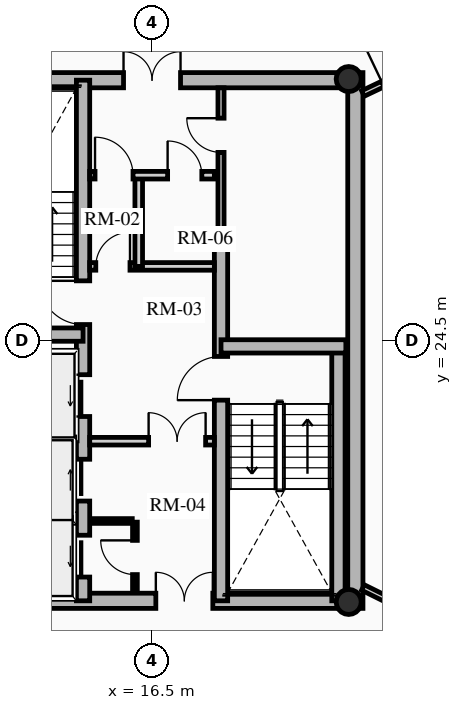
"""IFC4 building model, lengths in metres.
Left out: names, types, materials, properties, quantities, classifications, styles, units other than length and angle.
Written with IfcOpenShell. Run it as: python <this file> out.ifc"""

import sys

from ifc_helpers import new_model, si_unit, direction, frame, frame_2d, origin, origin_2d, place, context, subcontext, project, spatial, rectangle, hollow_circle, extrude, source, transform, mapped, element, fill, save


model = new_model("IFC4")
c1 = context("Model", 3, precision=1e-05, world=origin(), true_north=direction((0.0, 1.0)))
c2 = subcontext(c1, "Body", "Model", "MODEL_VIEW")
j1 = project(units=[si_unit("LENGTHUNIT", "METRE"), si_unit("PLANEANGLEUNIT", "RADIAN")], contexts=[c1])
p1 = place(None, origin())
s1 = spatial("IfcSite", under=j1, at=p1, CompositionType="ELEMENT")
p2 = place(p1, origin())
s2 = spatial("IfcBuilding", under=s1, at=p2, CompositionType="ELEMENT")
p3 = place(p2, frame((0.0, 0.0, 214.12)))
s3 = spatial("IfcBuildingStorey", under=s2, at=p3, CompositionType="ELEMENT", Elevation=214.12)
p4 = place(p3, frame((21.85, 17.45, 0.0), z_axis=(0.0, 0.0, 1.0), x_axis=(0.0, 1.0, 0.0)))
e1 = element("IfcWall", 1, at=p4, inside=s3, PredefinedType="SHEAR", context=c2, shape_type="SweptSolid", body=[
    extrude(rectangle(XDim=14.1, YDim=0.4, at=frame_2d((7.05, 0.0))), origin(), (0.0, 0.0, 1.0), 2.91),
])
p5 = place(p3, frame((11.15, 17.65, 0.0), z_axis=(0.0, 0.0, 1.0), x_axis=(1.0, 0.0, 0.0)))
e2 = element("IfcWall", 2, at=p5, inside=s3, PredefinedType="SHEAR", context=c2, shape_type="SweptSolid", body=[
    extrude(rectangle(XDim=10.7, YDim=0.4, at=frame_2d((5.35, 0.0))), origin(), (0.0, 0.0, 1.0), 2.91),
])
m1 = source(origin(), c2, "Body", "SweptSolid", [
    extrude(rectangle(XDim=1.5, YDim=2.02, at=frame_2d((0.75, 1.01))), frame((0.0, 0.21, 0.0), z_axis=(0.0, -1.0, 0.0), x_axis=(1.0, 0.0, 0.0)), (0.0, 0.0, 1.0), 0.42),
])
p6 = place(p5, frame((5.45, 0.0, 0.0)))
e3 = element("IfcOpeningElement", 3, at=p6, cuts=e2, PredefinedType="OPENING", context=c2, shape_type="MappedRepresentation", body=[
    mapped(m1, transform((0.0, 0.0, 0.0), x_axis=(1.0, 0.0, 0.0), y_axis=(0.0, 1.0, 0.0), z_axis=(0.0, 0.0, 1.0), scale=1.0)),
])
p7 = place(p3, frame((11.15, 31.35, 0.0), z_axis=(0.0, 0.0, 1.0), x_axis=(1.0, 0.0, 0.0)))
e4 = element("IfcWall", 4, at=p7, inside=s3, PredefinedType="SHEAR", context=c2, shape_type="SweptSolid", body=[
    extrude(rectangle(XDim=10.7, YDim=0.4, at=frame_2d((5.35, 0.0))), origin(), (0.0, 0.0, 1.0), 2.91),
])
p8 = place(p7, frame((4.6, 0.0, 0.0)))
e5 = element("IfcOpeningElement", 5, at=p8, cuts=e4, PredefinedType="OPENING", context=c2, shape_type="MappedRepresentation", body=[
    mapped(m1, transform((0.0, 0.0, 0.0), x_axis=(1.0, 0.0, 0.0), y_axis=(0.0, 1.0, 0.0), z_axis=(0.0, 0.0, 1.0), scale=1.0)),
])
p9 = place(p3, frame((14.685, 17.65, 0.0), z_axis=(0.0, 0.0, 1.0), x_axis=(0.0, 1.0, 0.0)))
e6 = element("IfcWall", 6, at=p9, inside=s3, PredefinedType="SHEAR", context=c2, shape_type="SweptSolid", body=[
    extrude(rectangle(XDim=13.7, YDim=0.35, at=frame_2d((6.85, 0.0))), origin(), (0.0, 0.0, 1.0), 2.91),
])
m2 = source(origin(), c2, "Body", "SweptSolid", [
    extrude(rectangle(XDim=1.1, YDim=2.015, at=frame_2d((0.55, 1.007))), frame((0.0, 0.185, 0.0), z_axis=(0.0, -1.0, 0.0), x_axis=(1.0, 0.0, 0.0)), (0.0, 0.0, 1.0), 0.37),
])
p10 = place(p9, frame((4.85, 0.0, 0.0)))
e7 = element("IfcOpeningElement", 7, at=p10, cuts=e6, PredefinedType="OPENING", context=c2, shape_type="MappedRepresentation", body=[
    mapped(m2, transform((0.0, 0.0, 0.0), x_axis=(1.0, 0.0, 0.0), y_axis=(0.0, 1.0, 0.0), z_axis=(0.0, 0.0, 1.0), scale=1.0)),
])
p11 = place(p9, frame((0.625, 0.0, 0.0)))
e8 = element("IfcOpeningElement", 8, at=p11, cuts=e6, PredefinedType="OPENING", context=c2, shape_type="MappedRepresentation", body=[
    mapped(m2, transform((0.0, 0.0, 0.0), x_axis=(1.0, 0.0, 0.0), y_axis=(0.0, 1.0, 0.0), z_axis=(0.0, 0.0, 1.0), scale=1.0)),
])
p12 = place(p9, frame((2.625, 0.0, 0.0)))
e9 = element("IfcOpeningElement", 9, at=p12, cuts=e6, PredefinedType="OPENING", context=c2, shape_type="MappedRepresentation", body=[
    mapped(m2, transform((0.0, 0.0, 0.0), x_axis=(1.0, 0.0, 0.0), y_axis=(0.0, 1.0, 0.0), z_axis=(0.0, 0.0, 1.0), scale=1.0)),
])
m3 = source(origin(), c2, "Body", "SweptSolid", [
    extrude(rectangle(XDim=1.15, YDim=2.02, at=frame_2d((0.575, 1.01))), frame((0.0, 0.185, 0.0), z_axis=(0.0, -1.0, 0.0), x_axis=(1.0, 0.0, 0.0)), (0.0, 0.0, 1.0), 0.37),
])
p13 = place(p9, frame((7.27, 0.0, 0.0)))
e10 = element("IfcOpeningElement", 10, at=p13, cuts=e6, PredefinedType="OPENING", context=c2, shape_type="MappedRepresentation", body=[
    mapped(m3, transform((0.0, 0.0, 0.0), x_axis=(1.0, 0.0, 0.0), y_axis=(0.0, 1.0, 0.0), z_axis=(0.0, 0.0, 1.0), scale=1.0)),
])
p14 = place(p3, frame((18.315, 17.65, 0.0), z_axis=(0.0, 0.0, 1.0), x_axis=(0.0, 1.0, 0.0)))
e11 = element("IfcWall", 11, at=p14, inside=s3, PredefinedType="SHEAR", context=c2, shape_type="SweptSolid", body=[
    extrude(rectangle(XDim=9.6, YDim=0.35, at=frame_2d((4.8, 0.0))), origin(), (0.0, 0.0, 1.0), 2.91),
])
p15 = place(p14, frame((5.28, 0.0, 0.0)))
e12 = element("IfcOpeningElement", 12, at=p15, cuts=e11, PredefinedType="OPENING", context=c2, shape_type="MappedRepresentation", body=[
    mapped(m3, transform((0.0, 0.0, 0.0), x_axis=(1.0, 0.0, 0.0), y_axis=(0.0, 1.0, 0.0), z_axis=(0.0, 0.0, 1.0), scale=1.0)),
])
p16 = place(p3, frame((11.4, 24.655, 0.0), z_axis=(0.0, 0.0, 1.0), x_axis=(1.0, 0.0, 0.0)))
e13 = element("IfcWall", 13, at=p16, inside=s3, PredefinedType="SHEAR", context=c2, shape_type="SweptSolid", body=[
    extrude(rectangle(XDim=3.285, YDim=0.35, at=frame_2d((1.643, 0.0))), origin(), (0.0, 0.0, 1.0), 2.91),
])
p17 = place(p3, frame((21.405, 17.65, 0.0), z_axis=(0.0, 0.0, 1.0), x_axis=(0.0, 1.0, 0.0)))
e14 = element("IfcWall", 14, at=p17, inside=s3, PredefinedType="SHEAR", context=c2, shape_type="SweptSolid", body=[
    extrude(rectangle(XDim=6.695, YDim=0.35, at=frame_2d((3.348, 0.0))), origin(), (0.0, 0.0, 1.0), 2.91),
])
p18 = place(p3, frame((18.315, 24.345, 0.0), z_axis=(0.0, 0.0, 1.0), x_axis=(1.0, 0.0, 0.0)))
e15 = element("IfcWall", 15, at=p18, inside=s3, PredefinedType="SHEAR", context=c2, shape_type="SweptSolid", body=[
    extrude(rectangle(XDim=3.285, YDim=0.35, at=frame_2d((1.643, 0.0))), origin(), (0.0, 0.0, 1.0), 2.91),
])
for number, where, z_axis, x_axis in (
    (16, (21.675, 17.62, 0.0), (0.0, 0.0, 1.0), (1.0, 0.0, 0.0)),
    (17, (21.675, 31.38, 0.0), (0.0, 0.0, 1.0), (1.0, 0.0, 0.0)),
):
    element("IfcColumn", number, at=place(p3, frame(where, z_axis=z_axis, x_axis=x_axis)), inside=s3, PredefinedType="COLUMN", context=c2, shape_type="SweptSolid", body=[
        extrude(hollow_circle(Radius=0.33, WallThickness=0.025, at=origin_2d()), origin(), (0.0, 0.0, 1.0), 2.91),
    ])
for number, where, z_axis, x_axis in (
    (18, (11.52, 21.8, 0.0), (0.0, 0.0, 1.0), (1.0, 0.0, 0.0)),
    (19, (11.52, 19.825, 0.0), (0.0, 0.0, 1.0), (1.0, 0.0, 0.0)),
):
    element("IfcWall", number, at=place(p3, frame(where, z_axis=z_axis, x_axis=x_axis)), inside=s3, PredefinedType="SHEAR", context=c2, shape_type="SweptSolid", body=[
        extrude(rectangle(XDim=2.97, YDim=0.2, at=frame_2d((1.485, 0.0))), origin(), (0.0, 0.0, 1.0), 2.91),
    ])
p19 = place(p3, frame((14.86, 21.85, 0.0), z_axis=(0.0, 0.0, 1.0), x_axis=(1.0, 0.0, 0.0)))
e20 = element("IfcWall", 20, at=p19, inside=s3, PredefinedType="PARTITIONING", context=c2, shape_type="SweptSolid", body=[
    extrude(rectangle(XDim=3.28, YDim=0.2, at=frame_2d((1.64, 0.0))), origin(), (0.0, 0.0, 1.0), 2.685),
])
m4 = source(origin(), c2, "Body", "SweptSolid", [
    extrude(rectangle(XDim=1.5, YDim=2.02, at=frame_2d((0.75, 1.01))), frame((0.0, 0.11, 0.0), z_axis=(0.0, -1.0, 0.0), x_axis=(1.0, 0.0, 0.0)), (0.0, 0.0, 1.0), 0.22),
])
p20 = place(p19, frame((1.55, 0.0, 0.0)))
e21 = element("IfcOpeningElement", 21, at=p20, cuts=e20, PredefinedType="OPENING", context=c2, shape_type="MappedRepresentation", body=[
    mapped(m4, transform((0.0, 0.0, 0.0), x_axis=(1.0, 0.0, 0.0), y_axis=(0.0, 1.0, 0.0), z_axis=(0.0, 0.0, 1.0), scale=1.0)),
])
p21 = place(p3, frame((14.86, 26.45, 0.0), z_axis=(0.0, 0.0, 1.0), x_axis=(1.0, 0.0, 0.0)))
e22 = element("IfcWall", 22, at=p21, inside=s3, PredefinedType="PARTITIONING", context=c2, shape_type="SweptSolid", body=[
    extrude(rectangle(XDim=3.28, YDim=0.2, at=frame_2d((1.64, 0.0))), origin(), (0.0, 0.0, 1.0), 2.685),
])
m5 = source(origin(), c2, "Body", "SweptSolid", [
    extrude(rectangle(XDim=0.9, YDim=2.005, at=frame_2d((0.45, 1.002))), frame((0.0, 0.11, 0.0), z_axis=(0.0, -1.0, 0.0), x_axis=(1.0, 0.0, 0.0)), (0.0, 0.0, 1.0), 0.22),
])
p22 = place(p21, frame((0.16, 0.0, 0.0)))
e23 = element("IfcOpeningElement", 23, at=p22, cuts=e22, PredefinedType="OPENING", context=c2, shape_type="MappedRepresentation", body=[
    mapped(m5, transform((0.0, 0.0, 0.0), x_axis=(1.0, 0.0, 0.0), y_axis=(0.0, 1.0, 0.0), z_axis=(0.0, 0.0, 1.0), scale=1.0)),
])
p23 = place(p3, frame((16.15, 26.45, 0.0), z_axis=(0.0, 0.0, 1.0), x_axis=(0.0, 1.0, 0.0)))
e24 = element("IfcWall", 24, at=p23, inside=s3, PredefinedType="PARTITIONING", context=c2, shape_type="SweptSolid", body=[
    extrude(rectangle(XDim=2.4, YDim=0.2, at=frame_2d((1.2, 0.0))), origin(), (0.0, 0.0, 1.0), 2.685),
])
p24 = place(p3, frame((14.86, 28.85, 0.0), z_axis=(0.0, 0.0, 1.0), x_axis=(1.0, 0.0, 0.0)))
e25 = element("IfcWall", 25, at=p24, inside=s3, PredefinedType="PARTITIONING", context=c2, shape_type="SweptSolid", body=[
    extrude(rectangle(XDim=3.28, YDim=0.2, at=frame_2d((1.64, 0.0))), origin(), (0.0, 0.0, 1.0), 2.685),
])
m6 = source(origin(), c2, "Body", "SweptSolid", [
    extrude(rectangle(XDim=1.0, YDim=2.015, at=frame_2d((0.5, 1.007))), frame((0.0, 0.11, 0.0), z_axis=(0.0, -1.0, 0.0), x_axis=(1.0, 0.0, 0.0)), (0.0, 0.0, 1.0), 0.22),
])
p25 = place(p24, frame((0.14, 0.0, 0.0)))
e26 = element("IfcOpeningElement", 26, at=p25, cuts=e25, PredefinedType="OPENING", context=c2, shape_type="MappedRepresentation", body=[
    mapped(m6, transform((0.0, 0.0, 0.0), x_axis=(1.0, 0.0, 0.0), y_axis=(0.0, 1.0, 0.0), z_axis=(0.0, 0.0, 1.0), scale=1.0)),
])
p26 = place(p24, frame((2.05, 0.0, 0.0)))
e27 = element("IfcOpeningElement", 27, at=p26, cuts=e25, PredefinedType="OPENING", context=c2, shape_type="MappedRepresentation", body=[
    mapped(m5, transform((0.0, 0.0, 0.0), x_axis=(1.0, 0.0, 0.0), y_axis=(0.0, 1.0, 0.0), z_axis=(0.0, 0.0, 1.0), scale=1.0)),
])
p27 = place(p3, frame((16.05, 17.92, 0.0), z_axis=(0.0, 0.0, 1.0), x_axis=(0.0, 1.0, 0.0)))
e28 = element("IfcWall", 28, at=p27, inside=s3, PredefinedType="PARTITIONING", context=c2, shape_type="SweptSolid", body=[
    extrude(rectangle(XDim=1.8, YDim=0.125, at=frame_2d((0.9, 0.0))), origin(), (0.0, 0.0, 1.0), 2.685),
])
m7 = source(origin(), c2, "Body", "SweptSolid", [
    extrude(rectangle(XDim=0.9, YDim=2.005, at=frame_2d((0.45, 1.002))), frame((0.0, 0.073, 0.0), z_axis=(0.0, -1.0, 0.0), x_axis=(1.0, 0.0, 0.0)), (0.0, 0.0, 1.0), 0.145),
])
p28 = place(p27, frame((0.42, 0.0, 0.0)))
e29 = element("IfcOpeningElement", 29, at=p28, cuts=e28, PredefinedType="OPENING", context=c2, shape_type="MappedRepresentation", body=[
    mapped(m7, transform((0.0, 0.0, 0.0), x_axis=(1.0, 0.0, 0.0), y_axis=(0.0, 1.0, 0.0), z_axis=(0.0, 0.0, 1.0), scale=1.0)),
])
p29 = place(p3, frame((14.88, 19.75, 0.0), z_axis=(0.0, 0.0, 1.0), x_axis=(1.0, 0.0, 0.0)))
e30 = element("IfcWall", 30, at=p29, inside=s3, PredefinedType="PARTITIONING", context=c2, shape_type="SweptSolid", body=[
    extrude(rectangle(XDim=1.1, YDim=0.125, at=frame_2d((0.55, 0.0))), origin(), (0.0, 0.0, 1.0), 2.685),
])
p30 = place(p3, frame((18.315, 27.25, 0.0), z_axis=(0.0, 0.0, 1.0), x_axis=(0.0, 1.0, 0.0)))
e31 = element("IfcWall", 31, at=p30, inside=s3, PredefinedType="PARTITIONING", context=c2, shape_type="SweptSolid", body=[
    extrude(rectangle(XDim=3.9, YDim=0.16, at=frame_2d((1.95, 0.0))), origin(), (0.0, 0.0, 1.0), 2.685),
])
m8 = source(origin(), c2, "Body", "SweptSolid", [
    extrude(rectangle(XDim=0.9, YDim=2.005, at=frame_2d((0.45, 1.002))), frame((0.0, 0.09, 0.0), z_axis=(0.0, -1.0, 0.0), x_axis=(1.0, 0.0, 0.0)), (0.0, 0.0, 1.0), 0.18),
])
p31 = place(p30, frame((2.2, 0.0, 0.0)))
e32 = element("IfcOpeningElement", 32, at=p31, cuts=e31, PredefinedType="OPENING", context=c2, shape_type="MappedRepresentation", body=[
    mapped(m8, transform((0.0, 0.0, 0.0), x_axis=(1.0, 0.0, 0.0), y_axis=(0.0, 1.0, 0.0), z_axis=(0.0, 0.0, 1.0), scale=1.0)),
])
p32 = place(p3, frame((22.05, 31.0, 0.0), z_axis=(0.0, 0.0, 1.0), x_axis=(0.903013459407, 0.429612257891, 0.0)))
e33 = element("IfcWall", 33, at=p32, inside=s3, PredefinedType="PARTITIONING", context=c2, shape_type="SweptSolid", body=[
    extrude(rectangle(XDim=1.829, YDim=0.16, at=frame_2d((0.914, 0.0))), origin(), (0.0, 0.0, 1.0), 2.255),
])
m9 = source(origin(), c2, "Body", "SweptSolid", [
    extrude(rectangle(XDim=1.05, YDim=2.015, at=frame_2d((0.525, 1.007))), frame((0.0, 0.09, 0.0), z_axis=(0.0, -1.0, 0.0), x_axis=(1.0, 0.0, 0.0)), (0.0, 0.0, 1.0), 0.18),
])
p33 = place(p32, frame((0.579, 0.0, 0.0)))
e34 = element("IfcOpeningElement", 34, at=p33, cuts=e33, PredefinedType="OPENING", context=c2, shape_type="MappedRepresentation", body=[
    mapped(m9, transform((0.0, 0.0, 0.0), x_axis=(1.0, 0.0, 0.0), y_axis=(0.0, 1.0, 0.0), z_axis=(0.0, 0.0, 1.0), scale=1.0)),
])
p34 = place(p3, frame((22.05, 18.0, 0.0), z_axis=(0.0, 0.0, 1.0), x_axis=(0.896045848613, -0.443961526692, 0.0)))
e35 = element("IfcWall", 35, at=p34, inside=s3, PredefinedType="PARTITIONING", context=c2, shape_type="SweptSolid", body=[
    extrude(rectangle(XDim=1.924, YDim=0.16, at=frame_2d((0.962, 0.0))), origin(), (0.0, 0.0, 1.0), 2.255),
])
p35 = place(p34, frame((0.674, 0.0, 0.0)))
e36 = element("IfcOpeningElement", 36, at=p35, cuts=e35, PredefinedType="OPENING", context=c2, shape_type="MappedRepresentation", body=[
    mapped(m9, transform((0.0, 0.0, 0.0), x_axis=(1.0, 0.0, 0.0), y_axis=(0.0, 1.0, 0.0), z_axis=(0.0, 0.0, 1.0), scale=1.0)),
])
m10 = source(origin(), c2, "Body", "SweptSolid", [
    extrude(rectangle(XDim=1.1, YDim=2.015, at=frame_2d((0.55, 1.007))), frame((0.0, 0.025, 0.0), z_axis=(0.0, -1.0, 0.0), x_axis=(1.0, 0.0, 0.0)), (0.0, 0.0, 1.0), 0.05),
])
p36 = place(p10, origin())
e37 = element("IfcDoor", 37, at=p36, inside=s3, OperationType="SLIDING_TO_LEFT", PredefinedType="DOOR", context=c2, shape_type="MappedRepresentation", body=[
    mapped(m10, transform((0.0, 0.0, 0.0), x_axis=(1.0, 0.0, 0.0), y_axis=(0.0, 1.0, 0.0), z_axis=(0.0, 0.0, 1.0), scale=1.0)),
])
fill(e7, e37)
p37 = place(p11, origin())
e38 = element("IfcDoor", 38, at=p37, inside=s3, OperationType="SLIDING_TO_LEFT", PredefinedType="DOOR", context=c2, shape_type="MappedRepresentation", body=[
    mapped(m10, transform((0.0, 0.0, 0.0), x_axis=(1.0, 0.0, 0.0), y_axis=(0.0, 1.0, 0.0), z_axis=(0.0, 0.0, 1.0), scale=1.0)),
])
fill(e8, e38)
p38 = place(p12, origin())
e39 = element("IfcDoor", 39, at=p38, inside=s3, OperationType="SLIDING_TO_RIGHT", PredefinedType="DOOR", context=c2, shape_type="MappedRepresentation", body=[
    mapped(m10, transform((0.0, 0.0, 0.0), x_axis=(1.0, 0.0, 0.0), y_axis=(0.0, 1.0, 0.0), z_axis=(0.0, 0.0, 1.0), scale=1.0)),
])
fill(e9, e39)
m11 = source(origin(), c2, "Body", "SweptSolid", [
    extrude(rectangle(XDim=1.15, YDim=2.02, at=frame_2d((0.575, 1.01))), frame((0.0, 0.025, 0.0), z_axis=(0.0, -1.0, 0.0), x_axis=(1.0, 0.0, 0.0)), (0.0, 0.0, 1.0), 0.05),
])
p39 = place(p13, origin())
e40 = element("IfcDoor", 40, at=p39, inside=s3, OperationType="SINGLE_SWING_RIGHT", PredefinedType="DOOR", context=c2, shape_type="MappedRepresentation", body=[
    mapped(m11, transform((0.0, 0.0, 0.0), x_axis=(1.0, 0.0, 0.0), y_axis=(0.0, 1.0, 0.0), z_axis=(0.0, 0.0, 1.0), scale=1.0)),
])
fill(e10, e40)
p40 = place(p15, origin())
e41 = element("IfcDoor", 41, at=p40, inside=s3, OperationType="SINGLE_SWING_LEFT", PredefinedType="DOOR", context=c2, shape_type="MappedRepresentation", body=[
    mapped(m11, transform((0.0, 0.0, 0.0), x_axis=(1.0, 0.0, 0.0), y_axis=(0.0, 1.0, 0.0), z_axis=(0.0, 0.0, 1.0), scale=1.0)),
])
fill(e12, e41)
m12 = source(origin(), c2, "Body", "SweptSolid", [
    extrude(rectangle(XDim=1.5, YDim=2.02, at=frame_2d((0.75, 1.01))), frame((0.0, 0.025, 0.0), z_axis=(0.0, -1.0, 0.0), x_axis=(1.0, 0.0, 0.0)), (0.0, 0.0, 1.0), 0.05),
])
p41 = place(p8, origin())
e42 = element("IfcDoor", 42, at=p41, inside=s3, OperationType="DOUBLE_DOOR_SINGLE_SWING", PredefinedType="DOOR", context=c2, shape_type="MappedRepresentation", body=[
    mapped(m12, transform((0.0, 0.0, 0.0), x_axis=(1.0, 0.0, 0.0), y_axis=(0.0, 1.0, 0.0), z_axis=(0.0, 0.0, 1.0), scale=1.0)),
])
fill(e5, e42)
p42 = place(p6, origin())
e43 = element("IfcDoor", 43, at=p42, inside=s3, OperationType="DOUBLE_DOOR_SINGLE_SWING", PredefinedType="DOOR", context=c2, shape_type="MappedRepresentation", body=[
    mapped(m12, transform((0.0, 0.0, 0.0), x_axis=(1.0, 0.0, 0.0), y_axis=(0.0, 1.0, 0.0), z_axis=(0.0, 0.0, 1.0), scale=1.0)),
])
fill(e3, e43)
p43 = place(p20, origin())
e44 = element("IfcDoor", 44, at=p43, inside=s3, OperationType="DOUBLE_DOOR_SINGLE_SWING", PredefinedType="DOOR", context=c2, shape_type="MappedRepresentation", body=[
    mapped(m12, transform((0.0, 0.0, 0.0), x_axis=(1.0, 0.0, 0.0), y_axis=(0.0, 1.0, 0.0), z_axis=(0.0, 0.0, 1.0), scale=1.0)),
])
fill(e21, e44)
m13 = source(origin(), c2, "Body", "SweptSolid", [
    extrude(rectangle(XDim=0.9, YDim=2.005, at=frame_2d((0.45, 1.002))), frame((0.0, 0.025, 0.0), z_axis=(0.0, -1.0, 0.0), x_axis=(1.0, 0.0, 0.0)), (0.0, 0.0, 1.0), 0.05),
])
p44 = place(p22, origin())
e45 = element("IfcDoor", 45, at=p44, inside=s3, OperationType="SINGLE_SWING_RIGHT", PredefinedType="DOOR", context=c2, shape_type="MappedRepresentation", body=[
    mapped(m13, transform((0.0, 0.0, 0.0), x_axis=(1.0, 0.0, 0.0), y_axis=(0.0, 1.0, 0.0), z_axis=(0.0, 0.0, 1.0), scale=1.0)),
])
fill(e23, e45)
m14 = source(origin(), c2, "Body", "SweptSolid", [
    extrude(rectangle(XDim=1.0, YDim=2.015, at=frame_2d((0.5, 1.007))), frame((0.0, 0.025, 0.0), z_axis=(0.0, -1.0, 0.0), x_axis=(1.0, 0.0, 0.0)), (0.0, 0.0, 1.0), 0.05),
])
p45 = place(p25, origin())
e46 = element("IfcDoor", 46, at=p45, inside=s3, OperationType="SINGLE_SWING_LEFT", PredefinedType="DOOR", context=c2, shape_type="MappedRepresentation", body=[
    mapped(m14, transform((0.0, 0.0, 0.0), x_axis=(1.0, 0.0, 0.0), y_axis=(0.0, 1.0, 0.0), z_axis=(0.0, 0.0, 1.0), scale=1.0)),
])
fill(e26, e46)
p46 = place(p28, origin())
e47 = element("IfcDoor", 47, at=p46, inside=s3, OperationType="SINGLE_SWING_RIGHT", PredefinedType="DOOR", context=c2, shape_type="MappedRepresentation", body=[
    mapped(m13, transform((0.0, 0.0, 0.0), x_axis=(1.0, 0.0, 0.0), y_axis=(0.0, 1.0, 0.0), z_axis=(0.0, 0.0, 1.0), scale=1.0)),
])
fill(e29, e47)
p47 = place(p26, origin())
e48 = element("IfcDoor", 48, at=p47, inside=s3, OperationType="SINGLE_SWING_LEFT", PredefinedType="DOOR", context=c2, shape_type="MappedRepresentation", body=[
    mapped(m13, transform((0.0, 0.0, 0.0), x_axis=(1.0, 0.0, 0.0), y_axis=(0.0, 1.0, 0.0), z_axis=(0.0, 0.0, 1.0), scale=1.0)),
])
fill(e27, e48)
p48 = place(p31, origin())
e49 = element("IfcDoor", 49, at=p48, inside=s3, OperationType="SINGLE_SWING_RIGHT", PredefinedType="DOOR", context=c2, shape_type="MappedRepresentation", body=[
    mapped(m13, transform((0.0, 0.0, 0.0), x_axis=(1.0, 0.0, 0.0), y_axis=(0.0, 1.0, 0.0), z_axis=(0.0, 0.0, 1.0), scale=1.0)),
])
fill(e32, e49)
save(model, sys.argv[1])
